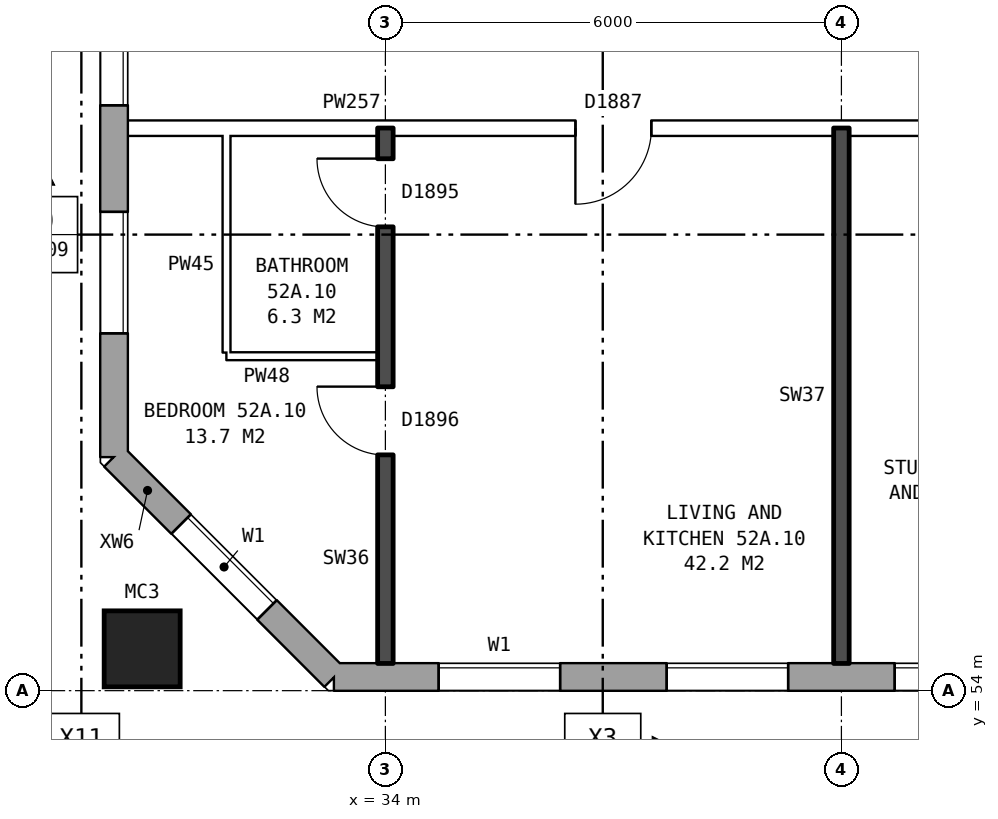
"""IFC4 building model, lengths in metres.
Left out: names, types, materials, properties, quantities, classifications, styles, units other than length and angle.
Written with IfcOpenShell. Run it as: python <this file> out.ifc"""

import sys

from ifc_helpers import new_model, si_unit, direction, frame, frame_2d, origin, origin_2d, place, context, subcontext, project, spatial, rectangle, hollow_rectangle, extrude, element, fill, save


model = new_model("IFC4")
c1 = context("Model", 3, precision=1e-05, world=origin(), true_north=direction((0.0, 1.0)))
c2 = subcontext(c1, "Body", "Model", "MODEL_VIEW")
j1 = project(units=[si_unit("LENGTHUNIT", "METRE"), si_unit("PLANEANGLEUNIT", "RADIAN")], contexts=[c1])
p1 = place(None, origin())
s1 = spatial("IfcSite", under=j1, at=p1, CompositionType="ELEMENT")
p2 = place(p1, origin())
s2 = spatial("IfcBuilding", under=s1, at=p2, CompositionType="ELEMENT")
p3 = place(p2, frame((0.0, 0.0, 185.1)))
s3 = spatial("IfcBuildingStorey", under=s2, at=p3, CompositionType="ELEMENT", Elevation=185.1)
p4 = place(p3, frame((30.8, 54.55, 0.0), z_axis=(0.0, 0.0, 1.0), x_axis=(1.0, 0.0, 0.0)))
e1 = element("IfcColumn", 1, at=p4, inside=s3, PredefinedType="COLUMN", context=c2, shape_type="SweptSolid", body=[
    extrude(hollow_rectangle(XDim=1.0, YDim=1.0, WallThickness=0.055, at=origin_2d()), origin(), (0.0, 0.0, 1.0), 3.1),
])
p5 = place(p3, frame((30.43, 57.075, 0.0), z_axis=(0.0, 0.0, 1.0), x_axis=(0.707106781187, -0.707106781187, 0.0)))
e2 = element("IfcWall", 2, at=p5, inside=s3, PredefinedType="STANDARD", context=c2, shape_type="SweptSolid", body=[
    extrude(rectangle(XDim=4.094, YDim=0.36, at=frame_2d((2.047, 0.0))), origin(), (0.0, 0.0, 1.0), 2.85),
])
p6 = place(p5, frame((1.247, 0.0, 0.8)))
e3 = element("IfcOpeningElement", 3, at=p6, cuts=e2, PredefinedType="OPENING", context=c2, shape_type="SweptSolid", body=[
    extrude(rectangle(XDim=1.6, YDim=1.8, at=frame_2d((0.8, 0.9))), frame((0.0, 0.19, 0.0), z_axis=(0.0, -1.0, 0.0), x_axis=(1.0, 0.0, 0.0)), (0.0, 0.0, 1.0), 0.38),
])
p7 = place(p3, frame((33.325, 54.18, 0.0), z_axis=(0.0, 0.0, 1.0), x_axis=(1.0, 0.0, 0.0)))
e4 = element("IfcWall", 4, at=p7, inside=s3, PredefinedType="STANDARD", context=c2, shape_type="SweptSolid", body=[
    extrude(rectangle(XDim=39.601, YDim=0.36, at=frame_2d((19.8, 0.0))), origin(), (0.0, 0.0, 1.0), 2.85),
])
p8 = place(p7, frame((1.375, 0.0, 0.8)))
e5 = element("IfcOpeningElement", 5, at=p8, cuts=e4, PredefinedType="OPENING", context=c2, shape_type="SweptSolid", body=[
    extrude(rectangle(XDim=1.6, YDim=1.8, at=frame_2d((0.8, 0.9))), frame((0.0, 0.19, 0.0), z_axis=(0.0, -1.0, 0.0), x_axis=(1.0, 0.0, 0.0)), (0.0, 0.0, 1.0), 0.38),
])
p9 = place(p7, frame((4.375, 0.0, 0.8)))
e6 = element("IfcOpeningElement", 6, at=p9, cuts=e4, PredefinedType="OPENING", context=c2, shape_type="SweptSolid", body=[
    extrude(rectangle(XDim=1.6, YDim=1.8, at=frame_2d((0.8, 0.9))), frame((0.0, 0.19, 0.0), z_axis=(0.0, -1.0, 0.0), x_axis=(1.0, 0.0, 0.0)), (0.0, 0.0, 1.0), 0.38),
])
p10 = place(p7, frame((7.375, 0.0, 0.8)))
e7 = element("IfcOpeningElement", 7, at=p10, cuts=e4, PredefinedType="OPENING", context=c2, shape_type="SweptSolid", body=[
    extrude(rectangle(XDim=1.6, YDim=1.8, at=frame_2d((0.8, 0.9))), frame((0.0, 0.19, 0.0), z_axis=(0.0, -1.0, 0.0), x_axis=(1.0, 0.0, 0.0)), (0.0, 0.0, 1.0), 0.38),
])
p11 = place(p7, frame((9.275, 0.0, 0.8)))
e8 = element("IfcOpeningElement", 8, at=p11, cuts=e4, PredefinedType="OPENING", context=c2, shape_type="SweptSolid", body=[
    extrude(rectangle(XDim=1.6, YDim=1.8, at=frame_2d((0.8, 0.9))), frame((0.0, 0.19, 0.0), z_axis=(0.0, -1.0, 0.0), x_axis=(1.0, 0.0, 0.0)), (0.0, 0.0, 1.0), 0.38),
])
p12 = place(p7, frame((13.075, 0.0, 0.8)))
e9 = element("IfcOpeningElement", 9, at=p12, cuts=e4, PredefinedType="OPENING", context=c2, shape_type="SweptSolid", body=[
    extrude(rectangle(XDim=0.6, YDim=0.9, at=frame_2d((0.3, 0.45))), frame((0.0, 0.19, 0.0), z_axis=(0.0, -1.0, 0.0), x_axis=(1.0, 0.0, 0.0)), (0.0, 0.0, 1.0), 0.38),
])
p13 = place(p7, frame((16.375, 0.0, 0.8)))
e10 = element("IfcOpeningElement", 10, at=p13, cuts=e4, PredefinedType="OPENING", context=c2, shape_type="SweptSolid", body=[
    extrude(rectangle(XDim=1.6, YDim=1.8, at=frame_2d((0.8, 0.9))), frame((0.0, 0.19, 0.0), z_axis=(0.0, -1.0, 0.0), x_axis=(1.0, 0.0, 0.0)), (0.0, 0.0, 1.0), 0.38),
])
p14 = place(p7, frame((19.375, 0.0, 0.8)))
e11 = element("IfcOpeningElement", 11, at=p14, cuts=e4, PredefinedType="OPENING", context=c2, shape_type="SweptSolid", body=[
    extrude(rectangle(XDim=1.6, YDim=1.8, at=frame_2d((0.8, 0.9))), frame((0.0, 0.19, 0.0), z_axis=(0.0, -1.0, 0.0), x_axis=(1.0, 0.0, 0.0)), (0.0, 0.0, 1.0), 0.38),
])
p15 = place(p7, frame((22.375, 0.0, 0.8)))
e12 = element("IfcOpeningElement", 12, at=p15, cuts=e4, PredefinedType="OPENING", context=c2, shape_type="SweptSolid", body=[
    extrude(rectangle(XDim=1.6, YDim=1.8, at=frame_2d((0.8, 0.9))), frame((0.0, 0.19, 0.0), z_axis=(0.0, -1.0, 0.0), x_axis=(1.0, 0.0, 0.0)), (0.0, 0.0, 1.0), 0.38),
])
p16 = place(p7, frame((24.875, 0.0, 0.75)))
e13 = element("IfcOpeningElement", 13, at=p16, cuts=e4, PredefinedType="OPENING", context=c2, shape_type="SweptSolid", body=[
    extrude(rectangle(XDim=0.8, YDim=1.8, at=frame_2d((0.4, 0.9))), frame((0.0, 0.19, 0.0), z_axis=(0.0, -1.0, 0.0), x_axis=(1.0, 0.0, 0.0)), (0.0, 0.0, 1.0), 0.38),
])
p17 = place(p7, frame((28.375, 0.0, 0.8)))
e14 = element("IfcOpeningElement", 14, at=p17, cuts=e4, PredefinedType="OPENING", context=c2, shape_type="SweptSolid", body=[
    extrude(rectangle(XDim=1.6, YDim=1.8, at=frame_2d((0.8, 0.9))), frame((0.0, 0.19, 0.0), z_axis=(0.0, -1.0, 0.0), x_axis=(1.0, 0.0, 0.0)), (0.0, 0.0, 1.0), 0.38),
])
p18 = place(p7, frame((31.375, 0.0, 0.8)))
e15 = element("IfcOpeningElement", 15, at=p18, cuts=e4, PredefinedType="OPENING", context=c2, shape_type="SweptSolid", body=[
    extrude(rectangle(XDim=1.6, YDim=1.8, at=frame_2d((0.8, 0.9))), frame((0.0, 0.19, 0.0), z_axis=(0.0, -1.0, 0.0), x_axis=(1.0, 0.0, 0.0)), (0.0, 0.0, 1.0), 0.38),
])
p19 = place(p7, frame((34.375, 0.0, 0.8)))
e16 = element("IfcOpeningElement", 16, at=p19, cuts=e4, PredefinedType="OPENING", context=c2, shape_type="SweptSolid", body=[
    extrude(rectangle(XDim=1.6, YDim=1.8, at=frame_2d((0.8, 0.9))), frame((0.0, 0.19, 0.0), z_axis=(0.0, -1.0, 0.0), x_axis=(1.0, 0.0, 0.0)), (0.0, 0.0, 1.0), 0.38),
])
p20 = place(p7, frame((37.375, 0.0, 0.8)))
e17 = element("IfcOpeningElement", 17, at=p20, cuts=e4, PredefinedType="OPENING", context=c2, shape_type="SweptSolid", body=[
    extrude(rectangle(XDim=1.6, YDim=1.8, at=frame_2d((0.8, 0.9))), frame((0.0, 0.19, 0.0), z_axis=(0.0, -1.0, 0.0), x_axis=(1.0, 0.0, 0.0)), (0.0, 0.0, 1.0), 0.38),
])
p21 = place(p7, frame((11.175, 0.0, 1.7)))
e18 = element("IfcOpeningElement", 18, at=p21, cuts=e4, PredefinedType="OPENING", context=c2, shape_type="SweptSolid", body=[
    extrude(rectangle(XDim=0.8, YDim=0.9, at=frame_2d((0.4, 0.45))), frame((0.0, 0.19, 0.0), z_axis=(0.0, -1.0, 0.0), x_axis=(1.0, 0.0, 0.0)), (0.0, 0.0, 1.0), 0.38),
])
p22 = place(p7, frame((13.975, 0.0, 0.8)))
e19 = element("IfcOpeningElement", 19, at=p22, cuts=e4, PredefinedType="OPENING", context=c2, shape_type="SweptSolid", body=[
    extrude(rectangle(XDim=1.4, YDim=1.8, at=frame_2d((0.7, 0.9))), frame((0.0, 0.19, 0.0), z_axis=(0.0, -1.0, 0.0), x_axis=(1.0, 0.0, 0.0)), (0.0, 0.0, 1.0), 0.38),
])
p23 = place(p7, frame((25.975, 0.0, 0.55)))
e20 = element("IfcOpeningElement", 20, at=p23, cuts=e4, PredefinedType="OPENING", context=c2, shape_type="SweptSolid", body=[
    extrude(rectangle(XDim=0.8, YDim=0.9, at=frame_2d((0.4, 0.45))), frame((0.0, 0.19, 0.0), z_axis=(0.0, -1.0, 0.0), x_axis=(1.0, 0.0, 0.0)), (0.0, 0.0, 1.0), 0.38),
])
p24 = place(p3, frame((30.43, 82.925, 0.0), z_axis=(0.0, 0.0, 1.0), x_axis=(0.0, -1.0, 0.0)))
e21 = element("IfcWall", 21, at=p24, inside=s3, PredefinedType="STANDARD", context=c2, shape_type="SweptSolid", body=[
    extrude(rectangle(XDim=25.851, YDim=0.36, at=frame_2d((12.925, 0.0))), origin(), (0.0, 0.0, 1.0), 2.85),
])
p25 = place(p24, frame((1.625, 0.0, 0.8)))
e22 = element("IfcOpeningElement", 22, at=p25, cuts=e21, PredefinedType="OPENING", context=c2, shape_type="SweptSolid", body=[
    extrude(rectangle(XDim=1.6, YDim=1.8, at=frame_2d((0.8, 0.9))), frame((0.0, 0.19, 0.0), z_axis=(0.0, -1.0, 0.0), x_axis=(1.0, 0.0, 0.0)), (0.0, 0.0, 1.0), 0.38),
])
p26 = place(p24, frame((4.625, 0.0, 0.8)))
e23 = element("IfcOpeningElement", 23, at=p26, cuts=e21, PredefinedType="OPENING", context=c2, shape_type="SweptSolid", body=[
    extrude(rectangle(XDim=1.6, YDim=1.8, at=frame_2d((0.8, 0.9))), frame((0.0, 0.19, 0.0), z_axis=(0.0, -1.0, 0.0), x_axis=(1.0, 0.0, 0.0)), (0.0, 0.0, 1.0), 0.38),
])
p27 = place(p24, frame((8.025, 0.0, 1.7)))
e24 = element("IfcOpeningElement", 24, at=p27, cuts=e21, PredefinedType="OPENING", context=c2, shape_type="SweptSolid", body=[
    extrude(rectangle(XDim=1.0, YDim=0.9, at=frame_2d((0.5, 0.45))), frame((0.0, 0.19, 0.0), z_axis=(0.0, -1.0, 0.0), x_axis=(1.0, 0.0, 0.0)), (0.0, 0.0, 1.0), 0.38),
])
p28 = place(p24, frame((10.625, 0.0, 0.8)))
e25 = element("IfcOpeningElement", 25, at=p28, cuts=e21, PredefinedType="OPENING", context=c2, shape_type="SweptSolid", body=[
    extrude(rectangle(XDim=1.6, YDim=1.8, at=frame_2d((0.8, 0.9))), frame((0.0, 0.19, 0.0), z_axis=(0.0, -1.0, 0.0), x_axis=(1.0, 0.0, 0.0)), (0.0, 0.0, 1.0), 0.38),
])
p29 = place(p24, frame((13.625, 0.0, 0.8)))
e26 = element("IfcOpeningElement", 26, at=p29, cuts=e21, PredefinedType="OPENING", context=c2, shape_type="SweptSolid", body=[
    extrude(rectangle(XDim=1.6, YDim=1.8, at=frame_2d((0.8, 0.9))), frame((0.0, 0.19, 0.0), z_axis=(0.0, -1.0, 0.0), x_axis=(1.0, 0.0, 0.0)), (0.0, 0.0, 1.0), 0.38),
])
p30 = place(p24, frame((9.325, 0.0, 0.8)))
e27 = element("IfcOpeningElement", 27, at=p30, cuts=e21, PredefinedType="OPENING", context=c2, shape_type="SweptSolid", body=[
    extrude(rectangle(XDim=1.0, YDim=1.8, at=frame_2d((0.5, 0.9))), frame((0.0, 0.19, 0.0), z_axis=(0.0, -1.0, 0.0), x_axis=(1.0, 0.0, 0.0)), (0.0, 0.0, 1.0), 0.38),
])
p31 = place(p24, frame((19.625, 0.0, 0.8)))
e28 = element("IfcOpeningElement", 28, at=p31, cuts=e21, PredefinedType="OPENING", context=c2, shape_type="SweptSolid", body=[
    extrude(rectangle(XDim=1.6, YDim=1.8, at=frame_2d((0.8, 0.9))), frame((0.0, 0.19, 0.0), z_axis=(0.0, -1.0, 0.0), x_axis=(1.0, 0.0, 0.0)), (0.0, 0.0, 1.0), 0.38),
])
p32 = place(p24, frame((22.625, 0.0, 0.8)))
e29 = element("IfcOpeningElement", 29, at=p32, cuts=e21, PredefinedType="OPENING", context=c2, shape_type="SweptSolid", body=[
    extrude(rectangle(XDim=1.6, YDim=1.8, at=frame_2d((0.8, 0.9))), frame((0.0, 0.19, 0.0), z_axis=(0.0, -1.0, 0.0), x_axis=(1.0, 0.0, 0.0)), (0.0, 0.0, 1.0), 0.38),
])
p33 = place(p24, frame((12.525, 0.0, 0.8)))
e30 = element("IfcOpeningElement", 30, at=p33, cuts=e21, PredefinedType="OPENING", context=c2, shape_type="SweptSolid", body=[
    extrude(rectangle(XDim=0.8, YDim=1.8, at=frame_2d((0.4, 0.9))), frame((0.0, 0.19, 0.0), z_axis=(0.0, -1.0, 0.0), x_axis=(1.0, 0.0, 0.0)), (0.0, 0.0, 1.0), 0.38),
])
p34 = place(p24, frame((15.525, 0.0, 0.8)))
e31 = element("IfcOpeningElement", 31, at=p34, cuts=e21, PredefinedType="OPENING", context=c2, shape_type="SweptSolid", body=[
    extrude(rectangle(XDim=1.0, YDim=1.8, at=frame_2d((0.5, 0.9))), frame((0.0, 0.19, 0.0), z_axis=(0.0, -1.0, 0.0), x_axis=(1.0, 0.0, 0.0)), (0.0, 0.0, 1.0), 0.38),
])
p35 = place(p24, frame((16.825, 0.0, 1.7)))
e32 = element("IfcOpeningElement", 32, at=p35, cuts=e21, PredefinedType="OPENING", context=c2, shape_type="SweptSolid", body=[
    extrude(rectangle(XDim=1.0, YDim=0.9, at=frame_2d((0.5, 0.45))), frame((0.0, 0.19, 0.0), z_axis=(0.0, -1.0, 0.0), x_axis=(1.0, 0.0, 0.0)), (0.0, 0.0, 1.0), 0.38),
])
p36 = place(p3, frame((31.91, 58.4, 0.0), z_axis=(0.0, 0.0, 1.0), x_axis=(1.0, 0.0, 0.0)))
e33 = element("IfcWall", 33, at=p36, inside=s3, PredefinedType="PARTITIONING", context=c2, shape_type="SweptSolid", body=[
    extrude(rectangle(XDim=1.99, YDim=0.1, at=frame_2d((0.995, 0.0))), origin(), (0.0, 0.0, 1.0), 2.85),
])
p37 = place(p3, frame((30.61, 61.4, 0.0), z_axis=(0.0, 0.0, 1.0), x_axis=(1.0, 0.0, 0.0)))
e34 = element("IfcWall", 34, at=p37, inside=s3, PredefinedType="PARTITIONING", context=c2, shape_type="SweptSolid", body=[
    extrude(rectangle(XDim=15.29, YDim=0.2, at=frame_2d((7.645, 0.0))), origin(), (0.0, 0.0, 1.0), 2.85),
])
p38 = place(p37, frame((10.69, 0.0, 0.0)))
e35 = element("IfcOpeningElement", 35, at=p38, cuts=e34, PredefinedType="OPENING", context=c2, shape_type="SweptSolid", body=[
    extrude(rectangle(XDim=1.0, YDim=2.1, at=frame_2d((0.5, 1.05))), frame((0.0, 0.11, 0.0), z_axis=(0.0, -1.0, 0.0), x_axis=(1.0, 0.0, 0.0)), (0.0, 0.0, 1.0), 0.22),
])
p39 = place(p37, frame((5.89, 0.0, 0.0)))
e36 = element("IfcOpeningElement", 36, at=p39, cuts=e34, PredefinedType="OPENING", context=c2, shape_type="SweptSolid", body=[
    extrude(rectangle(XDim=1.0, YDim=2.1, at=frame_2d((0.5, 1.05))), frame((0.0, 0.11, 0.0), z_axis=(0.0, -1.0, 0.0), x_axis=(1.0, 0.0, 0.0)), (0.0, 0.0, 1.0), 0.22),
])
p40 = place(p3, frame((31.91, 58.45, 0.0), z_axis=(0.0, 0.0, 1.0), x_axis=(0.0, 1.0, 0.0)))
e37 = element("IfcWall", 37, at=p40, inside=s3, PredefinedType="PARTITIONING", context=c2, shape_type="SweptSolid", body=[
    extrude(rectangle(XDim=2.85, YDim=0.1, at=frame_2d((1.425, 0.0))), origin(), (0.0, 0.0, 1.0), 2.85),
])
p41 = place(p3, frame((34.0, 54.36, 0.0), z_axis=(0.0, 0.0, 1.0), x_axis=(0.0, 1.0, 0.0)))
e38 = element("IfcWall", 38, at=p41, inside=s3, PredefinedType="SOLIDWALL", context=c2, shape_type="SweptSolid", body=[
    extrude(rectangle(XDim=7.04, YDim=0.2, at=frame_2d((3.52, 0.0))), origin(), (0.0, 0.0, 1.0), 2.85),
])
p42 = place(p41, frame((2.74, 0.0, 0.0)))
e39 = element("IfcOpeningElement", 39, at=p42, cuts=e38, PredefinedType="OPENING", context=c2, shape_type="SweptSolid", body=[
    extrude(rectangle(XDim=0.9, YDim=2.1, at=frame_2d((0.45, 1.05))), frame((0.0, 0.11, 0.0), z_axis=(0.0, -1.0, 0.0), x_axis=(1.0, 0.0, 0.0)), (0.0, 0.0, 1.0), 0.22),
])
p43 = place(p41, frame((5.74, 0.0, 0.0)))
e40 = element("IfcOpeningElement", 40, at=p43, cuts=e38, PredefinedType="OPENING", context=c2, shape_type="SweptSolid", body=[
    extrude(rectangle(XDim=0.9, YDim=2.1, at=frame_2d((0.45, 1.05))), frame((0.0, 0.11, 0.0), z_axis=(0.0, -1.0, 0.0), x_axis=(1.0, 0.0, 0.0)), (0.0, 0.0, 1.0), 0.22),
])
p44 = place(p3, frame((40.0, 54.36, 0.0), z_axis=(0.0, 0.0, 1.0), x_axis=(0.0, 1.0, 0.0)))
e41 = element("IfcWall", 41, at=p44, inside=s3, PredefinedType="SOLIDWALL", context=c2, shape_type="SweptSolid", body=[
    extrude(rectangle(XDim=7.04, YDim=0.2, at=frame_2d((3.52, 0.0))), origin(), (0.0, 0.0, 1.0), 2.85),
])
p45 = place(p6, origin())
e42 = element("IfcWindow", 42, at=p45, inside=s3, PartitioningType="SINGLE_PANEL", PredefinedType="WINDOW", context=c2, shape_type="SweptSolid", body=[
    extrude(rectangle(XDim=1.6, YDim=1.8, at=frame_2d((0.8, 0.9))), frame((0.0, 0.15, 0.0), z_axis=(0.0, -1.0, 0.0), x_axis=(1.0, 0.0, 0.0)), (0.0, 0.0, 1.0), 0.06),
])
fill(e3, e42)
p46 = place(p8, origin())
e43 = element("IfcWindow", 43, at=p46, inside=s3, PartitioningType="SINGLE_PANEL", PredefinedType="WINDOW", context=c2, shape_type="SweptSolid", body=[
    extrude(rectangle(XDim=1.6, YDim=1.8, at=frame_2d((0.8, 0.9))), frame((0.0, 0.15, 0.0), z_axis=(0.0, -1.0, 0.0), x_axis=(1.0, 0.0, 0.0)), (0.0, 0.0, 1.0), 0.06),
])
fill(e5, e43)
p47 = place(p9, origin())
e44 = element("IfcWindow", 44, at=p47, inside=s3, PartitioningType="SINGLE_PANEL", PredefinedType="WINDOW", context=c2, shape_type="SweptSolid", body=[
    extrude(rectangle(XDim=1.6, YDim=1.8, at=frame_2d((0.8, 0.9))), frame((0.0, 0.15, 0.0), z_axis=(0.0, -1.0, 0.0), x_axis=(1.0, 0.0, 0.0)), (0.0, 0.0, 1.0), 0.06),
])
fill(e6, e44)
p48 = place(p10, origin())
e45 = element("IfcWindow", 45, at=p48, inside=s3, PartitioningType="SINGLE_PANEL", PredefinedType="WINDOW", context=c2, shape_type="SweptSolid", body=[
    extrude(rectangle(XDim=1.6, YDim=1.8, at=frame_2d((0.8, 0.9))), frame((0.0, 0.15, 0.0), z_axis=(0.0, -1.0, 0.0), x_axis=(1.0, 0.0, 0.0)), (0.0, 0.0, 1.0), 0.06),
])
fill(e7, e45)
p49 = place(p31, origin())
e46 = element("IfcWindow", 46, at=p49, inside=s3, PartitioningType="SINGLE_PANEL", PredefinedType="WINDOW", context=c2, shape_type="SweptSolid", body=[
    extrude(rectangle(XDim=1.6, YDim=1.8, at=frame_2d((0.8, 0.9))), frame((0.0, 0.15, 0.0), z_axis=(0.0, -1.0, 0.0), x_axis=(1.0, 0.0, 0.0)), (0.0, 0.0, 1.0), 0.06),
])
fill(e28, e46)
p50 = place(p32, origin())
e47 = element("IfcWindow", 47, at=p50, inside=s3, PartitioningType="SINGLE_PANEL", PredefinedType="WINDOW", context=c2, shape_type="SweptSolid", body=[
    extrude(rectangle(XDim=1.6, YDim=1.8, at=frame_2d((0.8, 0.9))), frame((0.0, 0.15, 0.0), z_axis=(0.0, -1.0, 0.0), x_axis=(1.0, 0.0, 0.0)), (0.0, 0.0, 1.0), 0.06),
])
fill(e29, e47)
p51 = place(p42, origin())
e48 = element("IfcDoor", 48, at=p51, inside=s3, OperationType="SINGLE_SWING_RIGHT", PredefinedType="DOOR", context=c2, shape_type="SweptSolid", body=[
    extrude(rectangle(XDim=0.9, YDim=2.1, at=frame_2d((0.45, 1.05))), frame((0.0, 0.025, 0.0), z_axis=(0.0, -1.0, 0.0), x_axis=(1.0, 0.0, 0.0)), (0.0, 0.0, 1.0), 0.05),
])
fill(e39, e48)
p52 = place(p39, frame((1.0, 0.0, 0.0), z_axis=(0.0, 0.0, 1.0), x_axis=(-1.0, 0.0, 0.0)))
e49 = element("IfcDoor", 49, at=p52, inside=s3, OperationType="SINGLE_SWING_RIGHT", PredefinedType="DOOR", context=c2, shape_type="SweptSolid", body=[
    extrude(rectangle(XDim=1.0, YDim=2.1, at=frame_2d((0.5, 1.05))), frame((0.0, 0.025, 0.0), z_axis=(0.0, -1.0, 0.0), x_axis=(1.0, 0.0, 0.0)), (0.0, 0.0, 1.0), 0.05),
])
fill(e36, e49)
p53 = place(p43, origin())
e50 = element("IfcDoor", 50, at=p53, inside=s3, OperationType="SINGLE_SWING_RIGHT", PredefinedType="DOOR", context=c2, shape_type="SweptSolid", body=[
    extrude(rectangle(XDim=0.9, YDim=2.1, at=frame_2d((0.45, 1.05))), frame((0.0, 0.025, 0.0), z_axis=(0.0, -1.0, 0.0), x_axis=(1.0, 0.0, 0.0)), (0.0, 0.0, 1.0), 0.05),
])
fill(e40, e50)
save(model, sys.argv[1])
